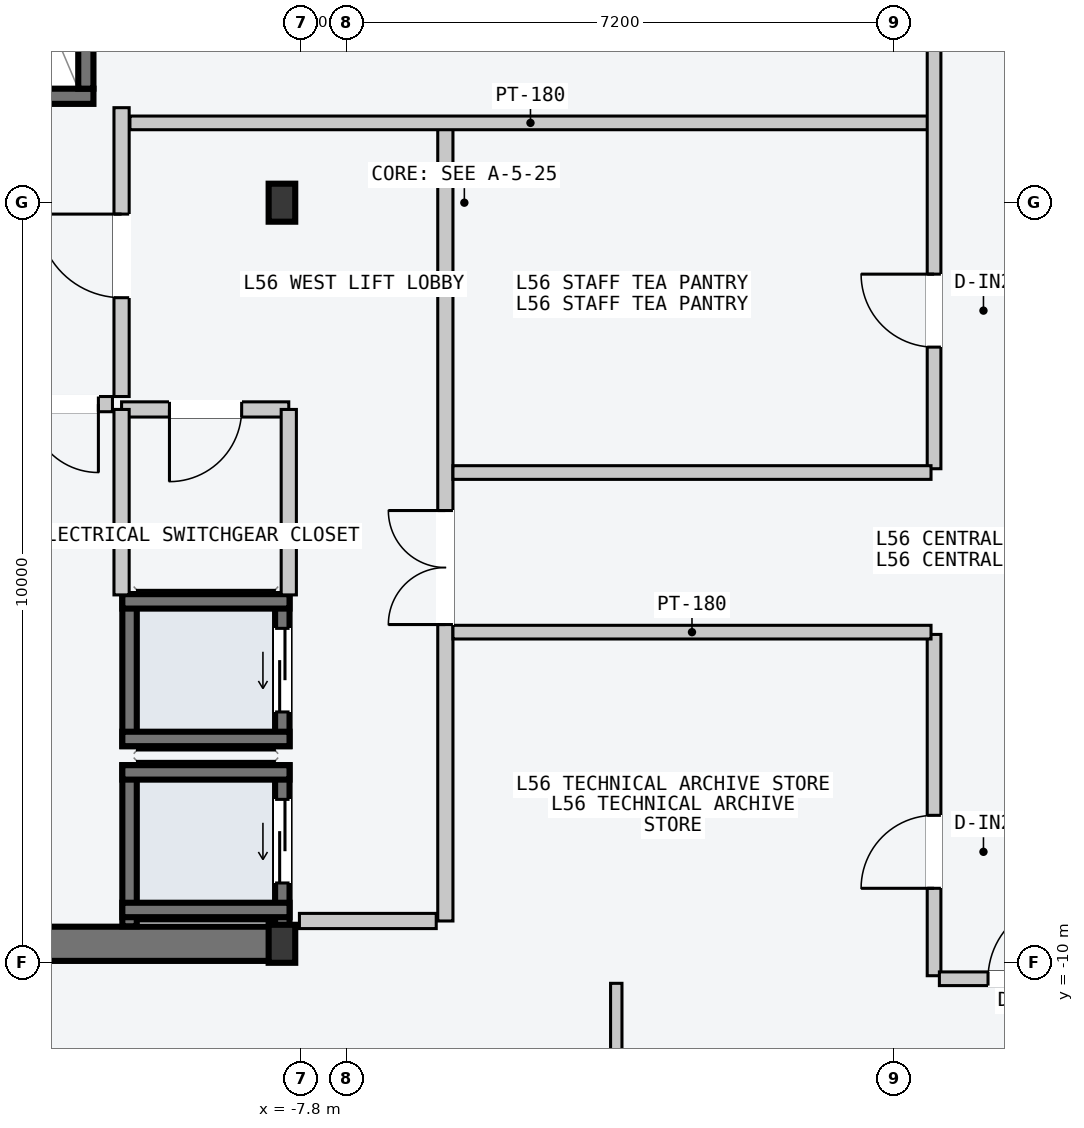
"""IFC4 building model, lengths in metres.
Left out: names, types, materials, properties, quantities, classifications, styles, units other than length and angle.
Written with IfcOpenShell. Run it as: python <this file> out.ifc"""

import sys

from ifc_helpers import new_model, si_unit, direction, frame, frame_2d, origin, origin_2d, place, context, subcontext, project, spatial, rectangle, i_section, extrude, element, fill, save


model = new_model("IFC4")
c1 = context("Model", 3, precision=1e-05, world=origin(), true_north=direction((0.0, 1.0)))
c2 = subcontext(c1, "Body", "Model", "MODEL_VIEW")
j1 = project(units=[si_unit("LENGTHUNIT", "METRE"), si_unit("PLANEANGLEUNIT", "RADIAN")], contexts=[c1])
p1 = place(None, origin())
s1 = spatial("IfcSite", under=j1, at=p1, CompositionType="ELEMENT")
p2 = place(p1, origin())
s2 = spatial("IfcBuilding", under=s1, at=p2, CompositionType="ELEMENT")
p3 = place(p2, frame((0.0, 0.0, 213.9)))
s3 = spatial("IfcBuildingStorey", under=s2, at=p3, CompositionType="ELEMENT", Elevation=213.9)
p4 = place(p3, frame((-14.53, -9.75, -0.2), z_axis=(0.0, 0.0, 1.0), x_axis=(1.0, 0.0, 0.0)))
e1 = element("IfcWall", 1, at=p4, inside=s3, PredefinedType="SHEAR", context=c2, shape_type="SweptSolid", body=[
    extrude(rectangle(XDim=6.46, YDim=0.45, at=frame_2d((3.23, 0.0))), origin(), (0.0, 0.0, 1.0), 4.5),
])
p5 = place(p3, frame((-14.25, 1.4, -0.2), z_axis=(0.0, 0.0, 1.0), x_axis=(1.0, 0.0, 0.0)))
e2 = element("IfcWall", 2, at=p5, inside=s3, PredefinedType="SOLIDWALL", context=c2, shape_type="SweptSolid", body=[
    extrude(rectangle(XDim=3.72, YDim=0.2, at=frame_2d((1.86, 0.0))), origin(), (0.0, 0.0, 1.0), 4.5),
])
p6 = place(p5, frame((1.5, 0.0, 0.2)))
e3 = element("IfcOpeningElement", 3, at=p6, cuts=e2, PredefinedType="OPENING", context=c2, shape_type="SweptSolid", body=[
    extrude(rectangle(XDim=1.12, YDim=2.18, at=frame_2d((0.56, 1.09))), frame((0.0, 0.11, 0.0), z_axis=(0.0, -1.0, 0.0), x_axis=(1.0, 0.0, 0.0)), (0.0, 0.0, 1.0), 0.22),
])
p7 = place(p3, frame((-10.63, 1.5, -0.2), z_axis=(0.0, 0.0, 1.0), x_axis=(0.0, 1.0, 0.0)))
e4 = element("IfcWall", 4, at=p7, inside=s3, PredefinedType="SOLIDWALL", context=c2, shape_type="SweptSolid", body=[
    extrude(rectangle(XDim=7.8, YDim=0.2, at=frame_2d((3.9, 0.0))), origin(), (0.0, 0.0, 1.0), 4.5),
])
for number, where, z_axis, x_axis in (
    (5, (-8.05, -9.75, 0.0), (0.0, 0.0, 1.0), (1.0, 0.0, 0.0)),
    (6, (-8.05, 0.0, 0.0), (0.0, 0.0, 1.0), (1.0, 0.0, 0.0)),
):
    element("IfcColumn", number, at=place(p3, frame(where, z_axis=z_axis, x_axis=x_axis)), inside=s3, PredefinedType="COLUMN", context=c2, shape_type="SweptSolid", body=[
        extrude(i_section(OverallWidth=0.35, OverallDepth=0.5, WebThickness=0.02, FlangeThickness=0.032, at=origin_2d()), origin(), (0.0, 0.0, 1.0), 4.5),
    ])
p8 = place(p3, frame((-8.045, -9.52, -0.2), z_axis=(0.0, 0.0, 1.0), x_axis=(0.0, 1.0, 0.0)))
e7 = element("IfcWall", 7, at=p8, inside=s3, PredefinedType="SOLIDWALL", context=c2, shape_type="SweptSolid", body=[
    extrude(rectangle(XDim=2.12, YDim=0.19, at=frame_2d((1.06, 0.0))), origin(), (0.0, 0.0, 1.0), 4.5),
])
p9 = place(p8, frame((0.57, 0.0, 0.2)))
e8 = element("IfcOpeningElement", 8, at=p9, cuts=e7, PredefinedType="OPENING", context=c2, shape_type="SweptSolid", body=[
    extrude(rectangle(XDim=1.1, YDim=2.2, at=frame_2d((0.55, 1.1))), frame((0.0, 0.105, 0.0), z_axis=(0.0, -1.0, 0.0), x_axis=(1.0, 0.0, 0.0)), (0.0, 0.0, 1.0), 0.21),
])
p10 = place(p3, frame((-10.055, -9.52, -0.2), z_axis=(0.0, 0.0, 1.0), x_axis=(0.0, 1.0, 0.0)))
e9 = element("IfcWall", 9, at=p10, inside=s3, PredefinedType="SOLIDWALL", context=c2, shape_type="SweptSolid", body=[
    extrude(rectangle(XDim=2.12, YDim=0.19, at=frame_2d((1.06, 0.0))), origin(), (0.0, 0.0, 1.0), 4.5),
])
for number, where, z_axis, x_axis in (
    (10, (-10.15, -7.495, -0.2), (0.0, 0.0, 1.0), (1.0, 0.0, 0.0)),
    (11, (-10.15, -9.305, -0.2), (0.0, 0.0, 1.0), (1.0, 0.0, 0.0)),
):
    element("IfcWall", number, at=place(p3, frame(where, z_axis=z_axis, x_axis=x_axis)), inside=s3, PredefinedType="SOLIDWALL", context=c2, shape_type="SweptSolid", body=[
        extrude(rectangle(XDim=2.2, YDim=0.19, at=frame_2d((1.1, 0.0))), origin(), (0.0, 0.0, 1.0), 4.5),
    ])
p11 = place(p3, frame((-8.045, -7.15, -0.2), z_axis=(0.0, 0.0, 1.0), x_axis=(0.0, 1.0, 0.0)))
e12 = element("IfcWall", 12, at=p11, inside=s3, PredefinedType="SOLIDWALL", context=c2, shape_type="SweptSolid", body=[
    extrude(rectangle(XDim=2.0, YDim=0.19, at=frame_2d((1.0, 0.0))), origin(), (0.0, 0.0, 1.0), 4.5),
])
p12 = place(p11, frame((0.45, 0.0, 0.2)))
e13 = element("IfcOpeningElement", 13, at=p12, cuts=e12, PredefinedType="OPENING", context=c2, shape_type="SweptSolid", body=[
    extrude(rectangle(XDim=1.1, YDim=2.2, at=frame_2d((0.55, 1.1))), frame((0.0, 0.105, 0.0), z_axis=(0.0, -1.0, 0.0), x_axis=(1.0, 0.0, 0.0)), (0.0, 0.0, 1.0), 0.21),
])
p13 = place(p3, frame((-10.055, -7.15, -0.2), z_axis=(0.0, 0.0, 1.0), x_axis=(0.0, 1.0, 0.0)))
e14 = element("IfcWall", 14, at=p13, inside=s3, PredefinedType="SOLIDWALL", context=c2, shape_type="SweptSolid", body=[
    extrude(rectangle(XDim=2.0, YDim=0.19, at=frame_2d((1.0, 0.0))), origin(), (0.0, 0.0, 1.0), 4.5),
])
for number, where, z_axis, x_axis in (
    (15, (-10.15, -5.245, -0.2), (0.0, 0.0, 1.0), (1.0, 0.0, 0.0)),
    (16, (-10.15, -7.055, -0.2), (0.0, 0.0, 1.0), (1.0, 0.0, 0.0)),
):
    element("IfcWall", number, at=place(p3, frame(where, z_axis=z_axis, x_axis=x_axis)), inside=s3, PredefinedType="SOLIDWALL", context=c2, shape_type="SweptSolid", body=[
        extrude(rectangle(XDim=2.2, YDim=0.19, at=frame_2d((1.1, 0.0))), origin(), (0.0, 0.0, 1.0), 4.5),
    ])
p14 = place(p3, frame((-5.9, -9.45, 0.0), z_axis=(0.0, 0.0, 1.0), x_axis=(0.0, 1.0, 0.0)))
e17 = element("IfcWall", 17, at=p14, inside=s3, PredefinedType="PARTITIONING", context=c2, shape_type="SweptSolid", body=[
    extrude(rectangle(XDim=10.5, YDim=0.2, at=frame_2d((5.25, 0.0))), origin(), (0.0, 0.0, 1.0), 4.3),
])
p15 = place(p14, frame((3.9, 0.0, 0.0)))
e18 = element("IfcOpeningElement", 18, at=p15, cuts=e17, PredefinedType="OPENING", context=c2, shape_type="SweptSolid", body=[
    extrude(rectangle(XDim=1.5, YDim=2.2, at=frame_2d((0.75, 1.1))), frame((0.0, 0.11, 0.0), z_axis=(0.0, -1.0, 0.0), x_axis=(1.0, 0.0, 0.0)), (0.0, 0.0, 1.0), 0.22),
])
p16 = place(p3, frame((-6.02, -9.45, 0.0), z_axis=(0.0, 0.0, 1.0), x_axis=(-1.0, 0.0, 0.0)))
e19 = element("IfcWall", 19, at=p16, inside=s3, PredefinedType="PARTITIONING", context=c2, shape_type="SweptSolid", body=[
    extrude(rectangle(XDim=1.8, YDim=0.2, at=frame_2d((0.9, 0.0))), origin(), (0.0, 0.0, 1.0), 4.3),
])
p17 = place(p3, frame((-10.16, -2.55, 0.0), z_axis=(0.0, 0.0, 1.0), x_axis=(0.0, 1.0, 0.0)))
e20 = element("IfcWall", 20, at=p17, inside=s3, PredefinedType="PARTITIONING", context=c2, shape_type="SweptSolid", body=[
    extrude(rectangle(XDim=3.8, YDim=0.2, at=frame_2d((1.9, 0.0))), origin(), (0.0, 0.0, 1.0), 4.3),
])
p18 = place(p17, frame((1.3, 0.0, 0.0)))
e21 = element("IfcOpeningElement", 21, at=p18, cuts=e20, PredefinedType="OPENING", context=c2, shape_type="SweptSolid", body=[
    extrude(rectangle(XDim=1.1, YDim=2.15, at=frame_2d((0.55, 1.075))), frame((0.0, 0.11, 0.0), z_axis=(0.0, -1.0, 0.0), x_axis=(1.0, 0.0, 0.0)), (0.0, 0.0, 1.0), 0.22),
])
p19 = place(p3, frame((-10.28, -2.65, 0.0), z_axis=(0.0, 0.0, 1.0), x_axis=(-1.0, 0.0, 0.0)))
e22 = element("IfcWall", 22, at=p19, inside=s3, PredefinedType="PARTITIONING", context=c2, shape_type="SweptSolid", body=[
    extrude(rectangle(XDim=1.27, YDim=0.2, at=frame_2d((0.635, 0.0))), origin(), (0.0, 0.0, 1.0), 4.3),
])
p20 = place(p19, frame((0.185, 0.0, 0.0)))
e23 = element("IfcOpeningElement", 23, at=p20, cuts=e22, PredefinedType="OPENING", context=c2, shape_type="SweptSolid", body=[
    extrude(rectangle(XDim=0.9, YDim=2.15, at=frame_2d((0.45, 1.075))), frame((0.0, 0.11, 0.0), z_axis=(0.0, -1.0, 0.0), x_axis=(1.0, 0.0, 0.0)), (0.0, 0.0, 1.0), 0.22),
])
p21 = place(p3, frame((-7.96, -2.72, 0.0), z_axis=(0.0, 0.0, 1.0), x_axis=(-1.0, 0.0, 0.0)))
e24 = element("IfcWall", 24, at=p21, inside=s3, PredefinedType="PARTITIONING", context=c2, shape_type="SweptSolid", body=[
    extrude(rectangle(XDim=2.2, YDim=0.2, at=frame_2d((1.1, 0.0))), origin(), (0.0, 0.0, 1.0), 4.3),
])
p22 = place(p21, frame((0.62, 0.0, 0.0)))
e25 = element("IfcOpeningElement", 25, at=p22, cuts=e24, PredefinedType="OPENING", context=c2, shape_type="SweptSolid", body=[
    extrude(rectangle(XDim=0.95, YDim=2.1, at=frame_2d((0.475, 1.05))), frame((0.0, 0.11, 0.0), z_axis=(0.0, -1.0, 0.0), x_axis=(1.0, 0.0, 0.0)), (0.0, 0.0, 1.0), 0.22),
])
for number, where, z_axis, x_axis in (
    (26, (-7.96, -5.16, 0.0), (0.0, 0.0, 1.0), (0.0, 1.0, 0.0)),
    (27, (-10.16, -5.16, 0.0), (0.0, 0.0, 1.0), (0.0, 1.0, 0.0)),
):
    element("IfcWall", number, at=place(p3, frame(where, z_axis=z_axis, x_axis=x_axis)), inside=s3, PredefinedType="PARTITIONING", context=c2, shape_type="SweptSolid", body=[
        extrude(rectangle(XDim=2.44, YDim=0.2, at=frame_2d((1.22, 0.0))), origin(), (0.0, 0.0, 1.0), 4.3),
    ])
p23 = place(p3, frame((-10.05, 1.05, 0.0), z_axis=(0.0, 0.0, 1.0), x_axis=(1.0, 0.0, 0.0)))
e28 = element("IfcWall", 28, at=p23, inside=s3, PredefinedType="PARTITIONING", context=c2, shape_type="SweptSolid", body=[
    extrude(rectangle(XDim=10.54, YDim=0.18, at=frame_2d((5.27, 0.0))), origin(), (0.0, 0.0, 1.0), 4.3),
])
p24 = place(p3, frame((0.53, -3.5, 0.0), z_axis=(0.0, 0.0, 1.0), x_axis=(0.0, 1.0, 0.0)))
e29 = element("IfcWall", 29, at=p24, inside=s3, PredefinedType="PARTITIONING", context=c2, shape_type="SweptSolid", body=[
    extrude(rectangle(XDim=13.67, YDim=0.18, at=frame_2d((6.835, 0.0))), origin(), (0.0, 0.0, 1.0), 4.3),
])
p25 = place(p24, frame((6.1, 0.0, 0.0)))
e30 = element("IfcOpeningElement", 30, at=p25, cuts=e29, PredefinedType="OPENING", context=c2, shape_type="SweptSolid", body=[
    extrude(rectangle(XDim=1.24, YDim=2.24, at=frame_2d((0.62, 1.12))), frame((0.0, 0.1, 0.0), z_axis=(0.0, -1.0, 0.0), x_axis=(1.0, 0.0, 0.0)), (0.0, 0.0, 1.0), 0.2),
])
p26 = place(p24, frame((1.6, 0.0, 0.0)))
e31 = element("IfcOpeningElement", 31, at=p26, cuts=e29, PredefinedType="OPENING", context=c2, shape_type="SweptSolid", body=[
    extrude(rectangle(XDim=0.96, YDim=2.18, at=frame_2d((0.48, 1.09))), frame((0.0, 0.1, 0.0), z_axis=(0.0, -1.0, 0.0), x_axis=(1.0, 0.0, 0.0)), (0.0, 0.0, 1.0), 0.2),
])
p27 = place(p3, frame((-5.8, -3.55, 0.0), z_axis=(0.0, 0.0, 1.0), x_axis=(1.0, 0.0, 0.0)))
e32 = element("IfcWall", 32, at=p27, inside=s3, PredefinedType="PARTITIONING", context=c2, shape_type="SweptSolid", body=[
    extrude(rectangle(XDim=6.29, YDim=0.18, at=frame_2d((3.145, 0.0))), origin(), (0.0, 0.0, 1.0), 4.3),
])
p28 = place(p3, frame((0.53, -10.17, 0.0), z_axis=(0.0, 0.0, 1.0), x_axis=(0.0, 1.0, 0.0)))
e33 = element("IfcWall", 33, at=p28, inside=s3, PredefinedType="PARTITIONING", context=c2, shape_type="SweptSolid", body=[
    extrude(rectangle(XDim=4.49, YDim=0.18, at=frame_2d((2.245, 0.0))), origin(), (0.0, 0.0, 1.0), 4.3),
])
p29 = place(p28, frame((1.15, 0.0, 0.0)))
e34 = element("IfcOpeningElement", 34, at=p29, cuts=e33, PredefinedType="OPENING", context=c2, shape_type="SweptSolid", body=[
    extrude(rectangle(XDim=0.96, YDim=2.18, at=frame_2d((0.48, 1.09))), frame((0.0, 0.1, 0.0), z_axis=(0.0, -1.0, 0.0), x_axis=(1.0, 0.0, 0.0)), (0.0, 0.0, 1.0), 0.2),
])
p30 = place(p3, frame((-5.8, -5.65, 0.0), z_axis=(0.0, 0.0, 1.0), x_axis=(1.0, 0.0, 0.0)))
e35 = element("IfcWall", 35, at=p30, inside=s3, PredefinedType="PARTITIONING", context=c2, shape_type="SweptSolid", body=[
    extrude(rectangle(XDim=6.29, YDim=0.18, at=frame_2d((3.145, 0.0))), origin(), (0.0, 0.0, 1.0), 4.3),
])
p31 = place(p3, frame((-3.651, -17.56, 0.0), z_axis=(0.0, 0.0, 1.0), x_axis=(0.0, 1.0, 0.0)))
e36 = element("IfcWall", 36, at=p31, inside=s3, PredefinedType="PARTITIONING", context=c2, shape_type="SweptSolid", body=[
    extrude(rectangle(XDim=7.29, YDim=0.15, at=frame_2d((3.645, 0.0))), origin(), (0.0, 0.0, 1.0), 4.3),
])
p32 = place(p31, frame((1.05, 0.0, 0.0)))
e37 = element("IfcOpeningElement", 37, at=p32, cuts=e36, PredefinedType="OPENING", context=c2, shape_type="SweptSolid", body=[
    extrude(rectangle(XDim=0.96, YDim=2.18, at=frame_2d((0.48, 1.09))), frame((0.0, 0.085, 0.0), z_axis=(0.0, -1.0, 0.0), x_axis=(1.0, 0.0, 0.0)), (0.0, 0.0, 1.0), 0.17),
])
p33 = place(p3, frame((0.6, -10.21, 0.0), z_axis=(0.0, 0.0, 1.0), x_axis=(1.0, 0.0, 0.0)))
e38 = element("IfcWall", 38, at=p33, inside=s3, PredefinedType="PARTITIONING", context=c2, shape_type="SweptSolid", body=[
    extrude(rectangle(XDim=2.3, YDim=0.18, at=frame_2d((1.15, 0.0))), origin(), (0.0, 0.0, 1.0), 4.3),
])
p34 = place(p33, frame((0.64, 0.0, 0.0)))
e39 = element("IfcOpeningElement", 39, at=p34, cuts=e38, PredefinedType="OPENING", context=c2, shape_type="SweptSolid", body=[
    extrude(rectangle(XDim=1.02, YDim=2.2, at=frame_2d((0.51, 1.1))), frame((0.0, 0.1, 0.0), z_axis=(0.0, -1.0, 0.0), x_axis=(1.0, 0.0, 0.0)), (0.0, 0.0, 1.0), 0.2),
])
p35 = place(p9, origin())
e40 = element("IfcDoor", 40, at=p35, inside=s3, OperationType="SLIDING_TO_LEFT", PredefinedType="DOOR", context=c2, shape_type="SweptSolid", body=[
    extrude(rectangle(XDim=1.1, YDim=2.2, at=frame_2d((0.55, 1.1))), frame((0.0, 0.025, 0.0), z_axis=(0.0, -1.0, 0.0), x_axis=(1.0, 0.0, 0.0)), (0.0, 0.0, 1.0), 0.05),
])
fill(e8, e40)
p36 = place(p12, origin())
e41 = element("IfcDoor", 41, at=p36, inside=s3, OperationType="SLIDING_TO_LEFT", PredefinedType="DOOR", context=c2, shape_type="SweptSolid", body=[
    extrude(rectangle(XDim=1.1, YDim=2.2, at=frame_2d((0.55, 1.1))), frame((0.0, 0.025, 0.0), z_axis=(0.0, -1.0, 0.0), x_axis=(1.0, 0.0, 0.0)), (0.0, 0.0, 1.0), 0.05),
])
fill(e13, e41)
p37 = place(p15, origin())
e42 = element("IfcDoor", 42, at=p37, inside=s3, OperationType="DOUBLE_DOOR_SINGLE_SWING", PredefinedType="DOOR", context=c2, shape_type="SweptSolid", body=[
    extrude(rectangle(XDim=1.5, YDim=2.2, at=frame_2d((0.75, 1.1))), frame((0.0, 0.025, 0.0), z_axis=(0.0, -1.0, 0.0), x_axis=(1.0, 0.0, 0.0)), (0.0, 0.0, 1.0), 0.05),
])
fill(e18, e42)
p38 = place(p18, origin())
e43 = element("IfcDoor", 43, at=p38, inside=s3, OperationType="SINGLE_SWING_RIGHT", PredefinedType="DOOR", context=c2, shape_type="SweptSolid", body=[
    extrude(rectangle(XDim=1.1, YDim=2.15, at=frame_2d((0.55, 1.075))), frame((0.0, 0.025, 0.0), z_axis=(0.0, -1.0, 0.0), x_axis=(1.0, 0.0, 0.0)), (0.0, 0.0, 1.0), 0.05),
])
fill(e21, e43)
p39 = place(p20, origin())
e44 = element("IfcDoor", 44, at=p39, inside=s3, OperationType="SINGLE_SWING_LEFT", PredefinedType="DOOR", context=c2, shape_type="SweptSolid", body=[
    extrude(rectangle(XDim=0.9, YDim=2.15, at=frame_2d((0.45, 1.075))), frame((0.0, 0.025, 0.0), z_axis=(0.0, -1.0, 0.0), x_axis=(1.0, 0.0, 0.0)), (0.0, 0.0, 1.0), 0.05),
])
fill(e23, e44)
p40 = place(p22, origin())
e45 = element("IfcDoor", 45, at=p40, inside=s3, OperationType="SINGLE_SWING_RIGHT", PredefinedType="DOOR", context=c2, shape_type="SweptSolid", body=[
    extrude(rectangle(XDim=0.95, YDim=2.1, at=frame_2d((0.475, 1.05))), frame((0.0, 0.025, 0.0), z_axis=(0.0, -1.0, 0.0), x_axis=(1.0, 0.0, 0.0)), (0.0, 0.0, 1.0), 0.05),
])
fill(e25, e45)
p41 = place(p26, origin())
e46 = element("IfcDoor", 46, at=p41, inside=s3, OperationType="SINGLE_SWING_RIGHT", PredefinedType="DOOR", context=c2, shape_type="SweptSolid", body=[
    extrude(rectangle(XDim=0.96, YDim=2.18, at=frame_2d((0.48, 1.09))), frame((0.0, 0.025, 0.0), z_axis=(0.0, -1.0, 0.0), x_axis=(1.0, 0.0, 0.0)), (0.0, 0.0, 1.0), 0.05),
])
fill(e31, e46)
p42 = place(p29, origin())
e47 = element("IfcDoor", 47, at=p42, inside=s3, OperationType="SINGLE_SWING_LEFT", PredefinedType="DOOR", context=c2, shape_type="SweptSolid", body=[
    extrude(rectangle(XDim=0.96, YDim=2.18, at=frame_2d((0.48, 1.09))), frame((0.0, 0.025, 0.0), z_axis=(0.0, -1.0, 0.0), x_axis=(1.0, 0.0, 0.0)), (0.0, 0.0, 1.0), 0.05),
])
fill(e34, e47)
p43 = place(p34, origin())
e48 = element("IfcDoor", 48, at=p43, inside=s3, OperationType="SINGLE_SWING_RIGHT", PredefinedType="DOOR", context=c2, shape_type="SweptSolid", body=[
    extrude(rectangle(XDim=1.02, YDim=2.2, at=frame_2d((0.51, 1.1))), frame((0.0, 0.025, 0.0), z_axis=(0.0, -1.0, 0.0), x_axis=(1.0, 0.0, 0.0)), (0.0, 0.0, 1.0), 0.05),
])
fill(e39, e48)
save(model, sys.argv[1])
